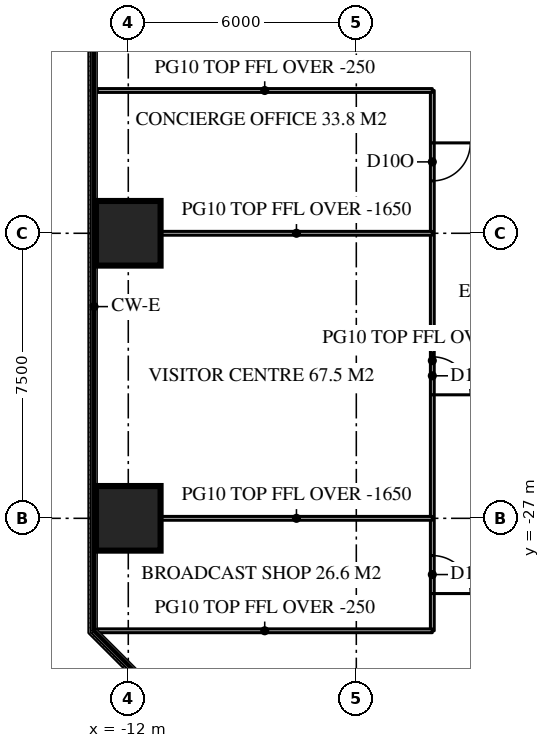
"""IFC4 building model, lengths in metres.
Left out: names, types, materials, properties, quantities, classifications, styles, units other than length and angle.
Written with IfcOpenShell. Run it as: python <this file> out.ifc"""

import sys

from ifc_helpers import new_model, si_unit, direction, frame, frame_2d, origin, origin_2d, place, context, subcontext, project, spatial, rectangle, extrude, element, fill, save


model = new_model("IFC4")
c1 = context("Model", 3, precision=1e-05, world=origin(), true_north=direction((0.0, 1.0)))
c2 = subcontext(c1, "Body", "Model", "MODEL_VIEW")
j1 = project(units=[si_unit("LENGTHUNIT", "METRE"), si_unit("PLANEANGLEUNIT", "RADIAN")], contexts=[c1])
p1 = place(None, origin())
s1 = spatial("IfcSite", under=j1, at=p1, CompositionType="ELEMENT")
p2 = place(p1, origin())
s2 = spatial("IfcBuilding", under=s1, at=p2, CompositionType="ELEMENT")
p3 = place(p2, origin())
s3 = spatial("IfcBuildingStorey", under=s2, at=p3, CompositionType="ELEMENT", Elevation=0.0)
for number, where, z_axis, x_axis in (
    (1, (-12.0, -27.0, 0.0), (0.0, 0.0, 1.0), (1.0, 0.0, 0.0)),
    (2, (-12.0, -19.5, 0.0), (0.0, 0.0, 1.0), (1.0, 0.0, 0.0)),
):
    element("IfcColumn", number, at=place(p3, frame(where, z_axis=z_axis, x_axis=x_axis)), inside=s3, PredefinedType="COLUMN", context=c2, shape_type="SweptSolid", body=[
        extrude(rectangle(XDim=1.7, YDim=1.7, at=origin_2d()), origin(), (0.0, 0.0, 1.0), 7.0),
    ])
p4 = place(p3, frame((-4.0, -15.743, 0.0), z_axis=(0.0, 0.0, 1.0), x_axis=(0.0, -1.0, 0.0)))
e3 = element("IfcWall", 3, at=p4, inside=s3, PredefinedType="PARTITIONING", context=c2, shape_type="SweptSolid", body=[
    extrude(rectangle(XDim=14.216, YDim=0.1, at=frame_2d((7.108, 0.0))), origin(), (0.0, 0.0, 1.0), 6.16),
])
p5 = place(p4, frame((1.378, 0.0, 0.0)))
e4 = element("IfcOpeningElement", 4, at=p5, cuts=e3, PredefinedType="OPENING", context=c2, shape_type="SweptSolid", body=[
    extrude(rectangle(XDim=1.0, YDim=2.2, at=frame_2d((0.5, 1.1))), frame((0.0, 0.06, 0.0), z_axis=(0.0, -1.0, 0.0), x_axis=(1.0, 0.0, 0.0)), (0.0, 0.0, 1.0), 0.12),
])
p6 = place(p4, frame((7.007, 0.0, 0.0)))
e5 = element("IfcOpeningElement", 5, at=p6, cuts=e3, PredefinedType="OPENING", context=c2, shape_type="SweptSolid", body=[
    extrude(rectangle(XDim=1.0, YDim=2.2, at=frame_2d((0.5, 1.1))), frame((0.0, 0.06, 0.0), z_axis=(0.0, -1.0, 0.0), x_axis=(1.0, 0.0, 0.0)), (0.0, 0.0, 1.0), 0.12),
])
p7 = place(p4, frame((12.237, 0.0, 0.0)))
e6 = element("IfcOpeningElement", 6, at=p7, cuts=e3, PredefinedType="OPENING", context=c2, shape_type="SweptSolid", body=[
    extrude(rectangle(XDim=1.0, YDim=2.2, at=frame_2d((0.5, 1.1))), frame((0.0, 0.06, 0.0), z_axis=(0.0, -1.0, 0.0), x_axis=(1.0, 0.0, 0.0)), (0.0, 0.0, 1.0), 0.12),
])
p8 = place(p3, frame((-4.0, -15.743, 0.0), z_axis=(0.0, 0.0, 1.0), x_axis=(-1.0, 0.0, 0.0)))
e7 = element("IfcWall", 7, at=p8, inside=s3, PredefinedType="PARTITIONING", context=c2, shape_type="SweptSolid", body=[
    extrude(rectangle(XDim=8.82, YDim=0.1, at=frame_2d((4.41, 0.0))), origin(), (0.0, 0.0, 1.0), 6.75),
])
for number, where, z_axis, x_axis in (
    (8, (-4.0, -19.5, 0.0), (0.0, 0.0, 1.0), (-1.0, 0.0, 0.0)),
    (9, (-4.0, -27.0, 0.0), (0.0, 0.0, 1.0), (-1.0, 0.0, 0.0)),
):
    element("IfcWall", number, at=place(p3, frame(where, z_axis=z_axis, x_axis=x_axis)), inside=s3, PredefinedType="PARTITIONING", context=c2, shape_type="SweptSolid", body=[
        extrude(rectangle(XDim=7.15, YDim=0.1, at=frame_2d((3.575, 0.0))), origin(), (0.0, 0.0, 1.0), 5.35),
    ])
p9 = place(p3, frame((-4.0, -29.959, 0.0), z_axis=(0.0, 0.0, 1.0), x_axis=(-1.0, 0.0, 0.0)))
e10 = element("IfcWall", 10, at=p9, inside=s3, PredefinedType="PARTITIONING", context=c2, shape_type="SweptSolid", body=[
    extrude(rectangle(XDim=8.82, YDim=0.1, at=frame_2d((4.41, 0.0))), origin(), (0.0, 0.0, 1.0), 6.75),
])
p10 = place(p5, origin())
e11 = element("IfcDoor", 11, at=p10, inside=s3, OperationType="SINGLE_SWING_LEFT", PredefinedType="DOOR", context=c2, shape_type="SweptSolid", body=[
    extrude(rectangle(XDim=1.0, YDim=2.2, at=frame_2d((0.5, 1.1))), frame((0.0, 0.025, 0.0), z_axis=(0.0, -1.0, 0.0), x_axis=(1.0, 0.0, 0.0)), (0.0, 0.0, 1.0), 0.05),
])
fill(e4, e11)
p11 = place(p6, origin())
e12 = element("IfcDoor", 12, at=p11, inside=s3, OperationType="SINGLE_SWING_RIGHT", PredefinedType="DOOR", context=c2, shape_type="SweptSolid", body=[
    extrude(rectangle(XDim=1.0, YDim=2.2, at=frame_2d((0.5, 1.1))), frame((0.0, 0.025, 0.0), z_axis=(0.0, -1.0, 0.0), x_axis=(1.0, 0.0, 0.0)), (0.0, 0.0, 1.0), 0.05),
])
fill(e5, e12)
p12 = place(p7, origin())
e13 = element("IfcDoor", 13, at=p12, inside=s3, OperationType="SINGLE_SWING_RIGHT", PredefinedType="DOOR", context=c2, shape_type="SweptSolid", body=[
    extrude(rectangle(XDim=1.0, YDim=2.2, at=frame_2d((0.5, 1.1))), frame((0.0, 0.025, 0.0), z_axis=(0.0, -1.0, 0.0), x_axis=(1.0, 0.0, 0.0)), (0.0, 0.0, 1.0), 0.05),
])
fill(e6, e13)
save(model, sys.argv[1])
